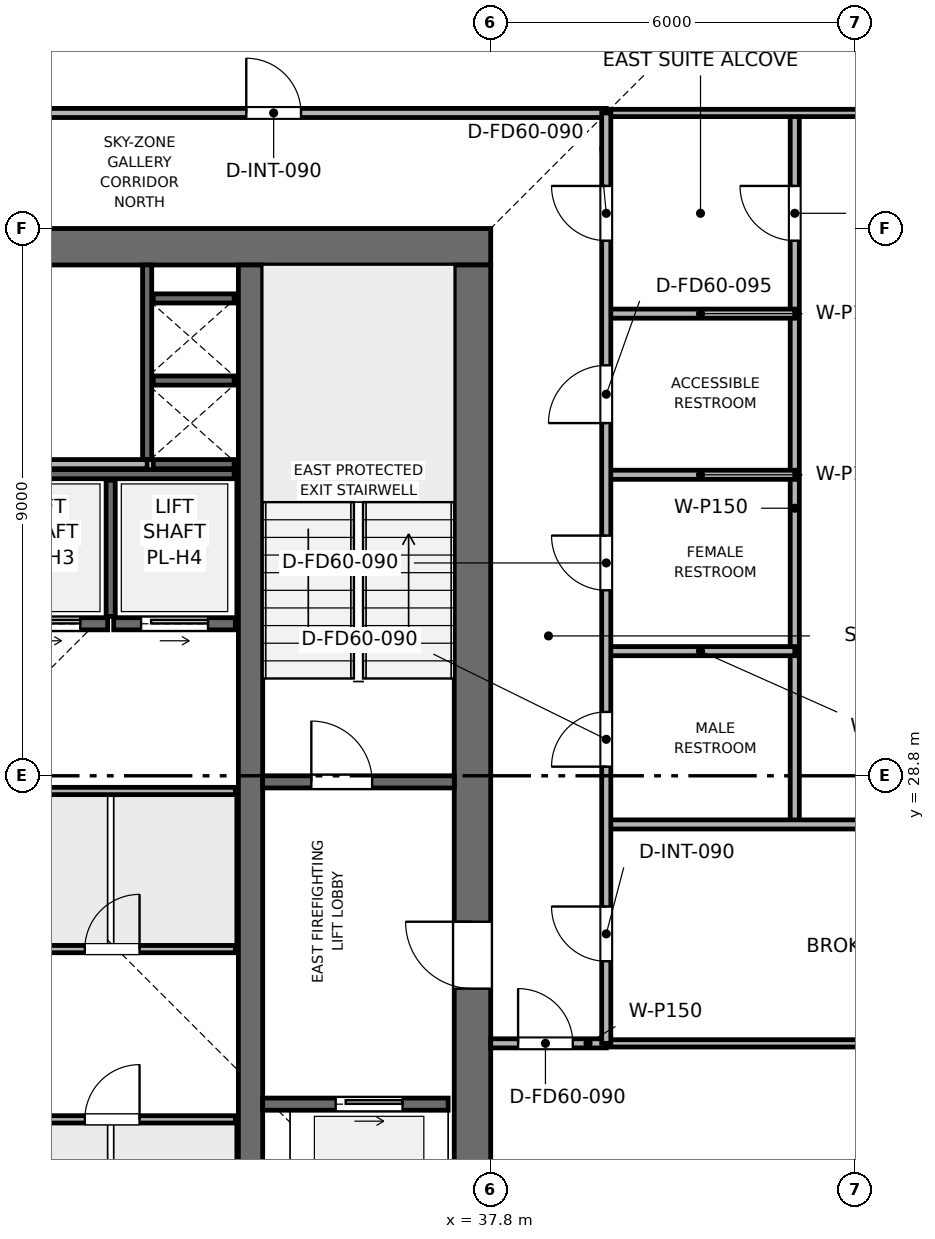
"""IFC4 building model, lengths in metres.
Left out: names, types, materials, properties, quantities, classifications, styles, units other than length and angle.
Written with IfcOpenShell. Run it as: python <this file> out.ifc"""

import sys

from ifc_helpers import new_model, si_unit, direction, frame, frame_2d, origin, place, context, subcontext, project, spatial, rectangle, extrude, element, fill, save


model = new_model("IFC4")
c1 = context("Model", 3, precision=1e-05, world=origin(), true_north=direction((0.0, 1.0)))
c2 = subcontext(c1, "Body", "Model", "MODEL_VIEW")
j1 = project(units=[si_unit("LENGTHUNIT", "METRE"), si_unit("PLANEANGLEUNIT", "RADIAN")], contexts=[c1])
p1 = place(None, origin())
s1 = spatial("IfcSite", under=j1, at=p1, CompositionType="ELEMENT")
p2 = place(p1, origin())
s2 = spatial("IfcBuilding", under=s1, at=p2, CompositionType="ELEMENT")
p3 = place(p2, frame((0.0, 0.0, 344.25)))
s3 = spatial("IfcBuildingStorey", under=s2, at=p3, CompositionType="ELEMENT", Elevation=344.25)
p4 = place(p3, frame((19.8, 37.5, 0.0), z_axis=(0.0, 0.0, 1.0), x_axis=(1.0, 0.0, 0.0)))
e1 = element("IfcWall", 1, at=p4, inside=s3, PredefinedType="SHEAR", context=c2, shape_type="SweptSolid", body=[
    extrude(rectangle(XDim=18.0, YDim=0.6, at=frame_2d((9.0, 0.0))), origin(), (0.0, 0.0, 1.0), 3.75),
])
p5 = place(p4, frame((7.05, 0.0, 0.0)))
e2 = element("IfcOpeningElement", 2, at=p5, cuts=e1, PredefinedType="OPENING", context=c2, shape_type="SweptSolid", body=[
    extrude(rectangle(XDim=1.1, YDim=2.15, at=frame_2d((0.55, 1.075))), frame((0.0, 0.31, 0.0), z_axis=(0.0, -1.0, 0.0), x_axis=(1.0, 0.0, 0.0)), (0.0, 0.0, 1.0), 0.62),
])
p6 = place(p3, frame((37.5, 20.4, 0.0), z_axis=(0.0, 0.0, 1.0), x_axis=(0.0, 1.0, 0.0)))
e3 = element("IfcWall", 3, at=p6, inside=s3, PredefinedType="SHEAR", context=c2, shape_type="SweptSolid", body=[
    extrude(rectangle(XDim=16.8, YDim=0.6, at=frame_2d((8.4, 0.0))), origin(), (0.0, 0.0, 1.0), 3.75),
])
p7 = place(p6, frame((4.9, 0.0, 0.0)))
e4 = element("IfcOpeningElement", 4, at=p7, cuts=e3, PredefinedType="OPENING", context=c2, shape_type="SweptSolid", body=[
    extrude(rectangle(XDim=1.1, YDim=2.15, at=frame_2d((0.55, 1.075))), frame((0.0, 0.31, 0.0), z_axis=(0.0, -1.0, 0.0), x_axis=(1.0, 0.0, 0.0)), (0.0, 0.0, 1.0), 0.62),
])
p8 = place(p3, frame((33.85, 20.4, 0.0), z_axis=(0.0, 0.0, 1.0), x_axis=(0.0, 1.0, 0.0)))
e5 = element("IfcWall", 5, at=p8, inside=s3, PredefinedType="SHEAR", context=c2, shape_type="SweptSolid", body=[
    extrude(rectangle(XDim=16.8, YDim=0.4, at=frame_2d((8.4, 0.0))), origin(), (0.0, 0.0, 1.0), 3.75),
])
p9 = place(p3, frame((34.05, 28.7, 0.0), z_axis=(0.0, 0.0, 1.0), x_axis=(1.0, 0.0, 0.0)))
e6 = element("IfcWall", 6, at=p9, inside=s3, PredefinedType="SHEAR", context=c2, shape_type="SweptSolid", body=[
    extrude(rectangle(XDim=3.15, YDim=0.2, at=frame_2d((1.575, 0.0))), origin(), (0.0, 0.0, 1.0), 3.51),
])
p10 = place(p9, frame((0.8, 0.0, 0.0)))
e7 = element("IfcOpeningElement", 7, at=p10, cuts=e6, PredefinedType="OPENING", context=c2, shape_type="SweptSolid", body=[
    extrude(rectangle(XDim=1.0, YDim=2.1, at=frame_2d((0.5, 1.05))), frame((0.0, 0.11, 0.0), z_axis=(0.0, -1.0, 0.0), x_axis=(1.0, 0.0, 0.0)), (0.0, 0.0, 1.0), 0.22),
])
p11 = place(p3, frame((32.15, 34.0, 0.0), z_axis=(0.0, 0.0, 1.0), x_axis=(0.0, 1.0, 0.0)))
e8 = element("IfcWall", 8, at=p11, inside=s3, PredefinedType="SHEAR", context=c2, shape_type="SweptSolid", body=[
    extrude(rectangle(XDim=3.2, YDim=0.15, at=frame_2d((1.6, 0.0))), origin(), (0.0, 0.0, 1.0), 3.51),
])
for number, where, z_axis, x_axis in (
    (9, (32.25, 33.925, 0.0), (0.0, 0.0, 1.0), (1.0, 0.0, 0.0)),
    (10, (32.25, 35.3, 0.0), (0.0, 0.0, 1.0), (1.0, 0.0, 0.0)),
):
    element("IfcWall", number, at=place(p3, frame(where, z_axis=z_axis, x_axis=x_axis)), inside=s3, PredefinedType="SHEAR", context=c2, shape_type="SweptSolid", body=[
        extrude(rectangle(XDim=1.33, YDim=0.15, at=frame_2d((0.665, 0.0))), origin(), (0.0, 0.0, 1.0), 3.51),
    ])
p12 = place(p3, frame((34.05, 23.4, 0.0), z_axis=(0.0, 0.0, 1.0), x_axis=(1.0, 0.0, 0.0)))
e11 = element("IfcWall", 11, at=p12, inside=s3, PredefinedType="SHEAR", context=c2, shape_type="SweptSolid", body=[
    extrude(rectangle(XDim=3.05, YDim=0.2, at=frame_2d((1.525, 0.0))), origin(), (0.0, 0.0, 1.0), 3.51),
])
p13 = place(p12, frame((1.2, 0.0, 0.0)))
e12 = element("IfcOpeningElement", 12, at=p13, cuts=e11, PredefinedType="OPENING", context=c2, shape_type="SweptSolid", body=[
    extrude(rectangle(XDim=1.1, YDim=2.15, at=frame_2d((0.55, 1.075))), frame((0.0, 0.11, 0.0), z_axis=(0.0, -1.0, 0.0), x_axis=(1.0, 0.0, 0.0)), (0.0, 0.0, 1.0), 0.22),
])
p14 = place(p3, frame((29.5, 31.3, 0.0), z_axis=(0.0, 0.0, 1.0), x_axis=(1.0, 0.0, 0.0)))
e13 = element("IfcWall", 13, at=p14, inside=s3, PredefinedType="SHEAR", context=c2, shape_type="SweptSolid", body=[
    extrude(rectangle(XDim=2.0, YDim=0.2, at=frame_2d((1.0, 0.0))), origin(), (0.0, 0.0, 1.0), 3.51),
])
p15 = place(p14, frame((0.45, 0.0, 0.0)))
e14 = element("IfcOpeningElement", 14, at=p15, cuts=e13, PredefinedType="OPENING", context=c2, shape_type="SweptSolid", body=[
    extrude(rectangle(XDim=1.1, YDim=2.15, at=frame_2d((0.55, 1.075))), frame((0.0, 0.11, 0.0), z_axis=(0.0, -1.0, 0.0), x_axis=(1.0, 0.0, 0.0)), (0.0, 0.0, 1.0), 0.22),
])
p16 = place(p3, frame((31.6, 31.3, 0.0), z_axis=(0.0, 0.0, 1.0), x_axis=(1.0, 0.0, 0.0)))
e15 = element("IfcWall", 15, at=p16, inside=s3, PredefinedType="SHEAR", context=c2, shape_type="SweptSolid", body=[
    extrude(rectangle(XDim=2.0, YDim=0.2, at=frame_2d((1.0, 0.0))), origin(), (0.0, 0.0, 1.0), 3.51),
])
p17 = place(p16, frame((0.45, 0.0, 0.0)))
e16 = element("IfcOpeningElement", 16, at=p17, cuts=e15, PredefinedType="OPENING", context=c2, shape_type="SweptSolid", body=[
    extrude(rectangle(XDim=1.1, YDim=2.15, at=frame_2d((0.55, 1.075))), frame((0.0, 0.11, 0.0), z_axis=(0.0, -1.0, 0.0), x_axis=(1.0, 0.0, 0.0)), (0.0, 0.0, 1.0), 0.22),
])
p18 = place(p3, frame((32.25, 36.65, 0.0), z_axis=(0.0, 0.0, 1.0), x_axis=(1.0, 0.0, 0.0)))
e17 = element("IfcWall", 17, at=p18, inside=s3, PredefinedType="SHEAR", context=c2, shape_type="SweptSolid", body=[
    extrude(rectangle(XDim=1.33, YDim=0.15, at=frame_2d((0.665, 0.0))), origin(), (0.0, 0.0, 1.0), 3.51),
])
p19 = place(p3, frame((29.5, 33.76, 0.0), z_axis=(0.0, 0.0, 1.0), x_axis=(1.0, 0.0, 0.0)))
e18 = element("IfcWall", 18, at=p19, inside=s3, PredefinedType="SHEAR", context=c2, shape_type="SweptSolid", body=[
    extrude(rectangle(XDim=4.08, YDim=0.15, at=frame_2d((2.04, 0.0))), origin(), (0.0, 0.0, 1.0), 3.51),
])
p20 = place(p3, frame((31.55, 31.42, 0.0), z_axis=(0.0, 0.0, 1.0), x_axis=(0.0, 1.0, 0.0)))
e19 = element("IfcWall", 19, at=p20, inside=s3, PredefinedType="SHEAR", context=c2, shape_type="SweptSolid", body=[
    extrude(rectangle(XDim=2.24, YDim=0.15, at=frame_2d((1.12, 0.0))), origin(), (0.0, 0.0, 1.0), 3.51),
])
p21 = place(p3, frame((29.525, 33.925, 0.0), z_axis=(0.0, 0.0, 1.0), x_axis=(1.0, 0.0, 0.0)))
e20 = element("IfcWall", 20, at=p21, inside=s3, PredefinedType="PARTITIONING", context=c2, shape_type="SweptSolid", body=[
    extrude(rectangle(XDim=2.625, YDim=0.15, at=frame_2d((1.312, 0.0))), origin(), (0.0, 0.0, 1.0), 3.51),
])
p22 = place(p3, frame((29.55, 23.15, 0.0), z_axis=(0.0, 0.0, 1.0), x_axis=(1.0, 0.0, 0.0)))
e21 = element("IfcWall", 21, at=p22, inside=s3, PredefinedType="PARTITIONING", context=c2, shape_type="SweptSolid", body=[
    extrude(rectangle(XDim=4.05, YDim=0.12, at=frame_2d((2.025, 0.0))), origin(), (0.0, 0.0, 1.0), 3.51),
])
p23 = place(p22, frame((1.575, 0.0, 0.0)))
e22 = element("IfcOpeningElement", 22, at=p23, cuts=e21, PredefinedType="OPENING", context=c2, shape_type="SweptSolid", body=[
    extrude(rectangle(XDim=0.9, YDim=2.1, at=frame_2d((0.45, 1.05))), frame((0.0, 0.07, 0.0), z_axis=(0.0, -1.0, 0.0), x_axis=(1.0, 0.0, 0.0)), (0.0, 0.0, 1.0), 0.14),
])
p24 = place(p3, frame((29.55, 25.95, 0.0), z_axis=(0.0, 0.0, 1.0), x_axis=(1.0, 0.0, 0.0)))
e23 = element("IfcWall", 23, at=p24, inside=s3, PredefinedType="PARTITIONING", context=c2, shape_type="SweptSolid", body=[
    extrude(rectangle(XDim=4.05, YDim=0.12, at=frame_2d((2.025, 0.0))), origin(), (0.0, 0.0, 1.0), 3.51),
])
p25 = place(p24, frame((1.575, 0.0, 0.0)))
e24 = element("IfcOpeningElement", 24, at=p25, cuts=e23, PredefinedType="OPENING", context=c2, shape_type="SweptSolid", body=[
    extrude(rectangle(XDim=0.9, YDim=2.1, at=frame_2d((0.45, 1.05))), frame((0.0, 0.07, 0.0), z_axis=(0.0, -1.0, 0.0), x_axis=(1.0, 0.0, 0.0)), (0.0, 0.0, 1.0), 0.14),
])
p26 = place(p3, frame((29.55, 28.55, 0.0), z_axis=(0.0, 0.0, 1.0), x_axis=(1.0, 0.0, 0.0)))
e25 = element("IfcWall", 25, at=p26, inside=s3, PredefinedType="PARTITIONING", context=c2, shape_type="SweptSolid", body=[
    extrude(rectangle(XDim=4.05, YDim=0.12, at=frame_2d((2.025, 0.0))), origin(), (0.0, 0.0, 1.0), 3.51),
])
p27 = place(p3, frame((37.8, 24.4, 0.0), z_axis=(0.0, 0.0, 1.0), x_axis=(1.0, 0.0, 0.0)))
e26 = element("IfcWall", 26, at=p27, inside=s3, PredefinedType="PARTITIONING", context=c2, shape_type="SweptSolid", body=[
    extrude(rectangle(XDim=1.9, YDim=0.15, at=frame_2d((0.95, 0.0))), origin(), (0.0, 0.0, 1.0), 3.51),
])
p28 = place(p27, frame((0.45, 0.0, 0.0)))
e27 = element("IfcOpeningElement", 27, at=p28, cuts=e26, PredefinedType="OPENING", context=c2, shape_type="SweptSolid", body=[
    extrude(rectangle(XDim=0.9, YDim=2.1, at=frame_2d((0.45, 1.05))), frame((0.0, 0.085, 0.0), z_axis=(0.0, -1.0, 0.0), x_axis=(1.0, 0.0, 0.0)), (0.0, 0.0, 1.0), 0.17),
])
p29 = place(p3, frame((39.7, 24.4, 0.0), z_axis=(0.0, 0.0, 1.0), x_axis=(1.0, 0.0, 0.0)))
e28 = element("IfcWall", 28, at=p29, inside=s3, PredefinedType="PARTITIONING", context=c2, shape_type="SweptSolid", body=[
    extrude(rectangle(XDim=10.27, YDim=0.12, at=frame_2d((5.135, 0.0))), origin(), (0.0, 0.0, 1.0), 3.135),
])
p30 = place(p3, frame((42.8, 28.0, 0.0), z_axis=(0.0, 0.0, 1.0), x_axis=(0.0, 1.0, 0.0)))
e29 = element("IfcWall", 29, at=p30, inside=s3, PredefinedType="PARTITIONING", context=c2, shape_type="SweptSolid", body=[
    extrude(rectangle(XDim=11.7, YDim=0.15, at=frame_2d((5.85, 0.0))), origin(), (0.0, 0.0, 1.0), 3.095),
])
p31 = place(p30, frame((9.6, 0.0, 0.0)))
e30 = element("IfcOpeningElement", 30, at=p31, cuts=e29, PredefinedType="OPENING", context=c2, shape_type="SweptSolid", body=[
    extrude(rectangle(XDim=0.9, YDim=2.1, at=frame_2d((0.45, 1.05))), frame((0.0, 0.085, 0.0), z_axis=(0.0, -1.0, 0.0), x_axis=(1.0, 0.0, 0.0)), (0.0, 0.0, 1.0), 0.17),
])
p32 = place(p3, frame((39.7, 28.0, 0.0), z_axis=(0.0, 0.0, 1.0), x_axis=(1.0, 0.0, 0.0)))
e31 = element("IfcWall", 31, at=p32, inside=s3, PredefinedType="PARTITIONING", context=c2, shape_type="SweptSolid", body=[
    extrude(rectangle(XDim=10.27, YDim=0.15, at=frame_2d((5.135, 0.0))), origin(), (0.0, 0.0, 1.0), 3.135),
])
for number, where, z_axis, x_axis in (
    (32, (39.7, 36.4, 0.0), (0.0, 0.0, 1.0), (1.0, 0.0, 0.0)),
    (33, (39.7, 30.85, 0.0), (0.0, 0.0, 1.0), (1.0, 0.0, 0.0)),
    (34, (39.7, 33.75, 0.0), (0.0, 0.0, 1.0), (1.0, 0.0, 0.0)),
):
    element("IfcWall", number, at=place(p3, frame(where, z_axis=z_axis, x_axis=x_axis)), inside=s3, PredefinedType="PARTITIONING", context=c2, shape_type="SweptSolid", body=[
        extrude(rectangle(XDim=3.1, YDim=0.15, at=frame_2d((1.55, 0.0))), origin(), (0.0, 0.0, 1.0), 3.135),
    ])
p33 = place(p3, frame((39.7, 39.7, 0.0), z_axis=(0.0, 0.0, 1.0), x_axis=(1.0, 0.0, 0.0)))
e35 = element("IfcWall", 35, at=p33, inside=s3, PredefinedType="PARTITIONING", context=c2, shape_type="SweptSolid", body=[
    extrude(rectangle(XDim=10.27, YDim=0.12, at=frame_2d((5.135, 0.0))), origin(), (0.0, 0.0, 1.0), 3.095),
])
p34 = place(p3, frame((17.9, 39.7, 0.0), z_axis=(0.0, 0.0, 1.0), x_axis=(1.0, 0.0, 0.0)))
e36 = element("IfcWall", 36, at=p34, inside=s3, PredefinedType="PARTITIONING", context=c2, shape_type="SweptSolid", body=[
    extrude(rectangle(XDim=21.8, YDim=0.15, at=frame_2d((10.9, 0.0))), origin(), (0.0, 0.0, 1.0), 3.095),
])
p35 = place(p34, frame((0.765, 0.0, 0.0)))
e37 = element("IfcOpeningElement", 37, at=p35, cuts=e36, PredefinedType="OPENING", context=c2, shape_type="SweptSolid", body=[
    extrude(rectangle(XDim=0.9, YDim=2.1, at=frame_2d((0.45, 1.05))), frame((0.0, 0.085, 0.0), z_axis=(0.0, -1.0, 0.0), x_axis=(1.0, 0.0, 0.0)), (0.0, 0.0, 1.0), 0.17),
])
p36 = place(p34, frame((6.195, 0.0, 0.0)))
e38 = element("IfcOpeningElement", 38, at=p36, cuts=e36, PredefinedType="OPENING", context=c2, shape_type="SweptSolid", body=[
    extrude(rectangle(XDim=0.9, YDim=2.1, at=frame_2d((0.45, 1.05))), frame((0.0, 0.085, 0.0), z_axis=(0.0, -1.0, 0.0), x_axis=(1.0, 0.0, 0.0)), (0.0, 0.0, 1.0), 0.17),
])
p37 = place(p34, frame((15.88, 0.0, 0.0)))
e39 = element("IfcOpeningElement", 39, at=p37, cuts=e36, PredefinedType="OPENING", context=c2, shape_type="SweptSolid", body=[
    extrude(rectangle(XDim=0.9, YDim=2.1, at=frame_2d((0.45, 1.05))), frame((0.0, 0.085, 0.0), z_axis=(0.0, -1.0, 0.0), x_axis=(1.0, 0.0, 0.0)), (0.0, 0.0, 1.0), 0.17),
])
p38 = place(p3, frame((39.7, 24.4, 0.0), z_axis=(0.0, 0.0, 1.0), x_axis=(0.0, 1.0, 0.0)))
e40 = element("IfcWall", 40, at=p38, inside=s3, PredefinedType="PARTITIONING", context=c2, shape_type="SweptSolid", body=[
    extrude(rectangle(XDim=15.3, YDim=0.15, at=frame_2d((7.65, 0.0))), origin(), (0.0, 0.0, 1.0), 3.095),
])
p39 = place(p38, frame((1.35, 0.0, 0.0)))
e41 = element("IfcOpeningElement", 41, at=p39, cuts=e40, PredefinedType="OPENING", context=c2, shape_type="SweptSolid", body=[
    extrude(rectangle(XDim=0.9, YDim=2.1, at=frame_2d((0.45, 1.05))), frame((0.0, 0.085, 0.0), z_axis=(0.0, -1.0, 0.0), x_axis=(1.0, 0.0, 0.0)), (0.0, 0.0, 1.0), 0.17),
])
p40 = place(p38, frame((4.55, 0.0, 0.0)))
e42 = element("IfcOpeningElement", 42, at=p40, cuts=e40, PredefinedType="OPENING", context=c2, shape_type="SweptSolid", body=[
    extrude(rectangle(XDim=0.9, YDim=2.1, at=frame_2d((0.45, 1.05))), frame((0.0, 0.085, 0.0), z_axis=(0.0, -1.0, 0.0), x_axis=(1.0, 0.0, 0.0)), (0.0, 0.0, 1.0), 0.17),
])
p41 = place(p38, frame((7.45, 0.0, 0.0)))
e43 = element("IfcOpeningElement", 43, at=p41, cuts=e40, PredefinedType="OPENING", context=c2, shape_type="SweptSolid", body=[
    extrude(rectangle(XDim=0.9, YDim=2.1, at=frame_2d((0.45, 1.05))), frame((0.0, 0.085, 0.0), z_axis=(0.0, -1.0, 0.0), x_axis=(1.0, 0.0, 0.0)), (0.0, 0.0, 1.0), 0.17),
])
p42 = place(p38, frame((10.2, 0.0, 0.0)))
e44 = element("IfcOpeningElement", 44, at=p42, cuts=e40, PredefinedType="OPENING", context=c2, shape_type="SweptSolid", body=[
    extrude(rectangle(XDim=0.95, YDim=2.1, at=frame_2d((0.475, 1.05))), frame((0.0, 0.085, 0.0), z_axis=(0.0, -1.0, 0.0), x_axis=(1.0, 0.0, 0.0)), (0.0, 0.0, 1.0), 0.17),
])
p43 = place(p38, frame((13.2, 0.0, 0.0)))
e45 = element("IfcOpeningElement", 45, at=p43, cuts=e40, PredefinedType="OPENING", context=c2, shape_type="SweptSolid", body=[
    extrude(rectangle(XDim=0.9, YDim=2.1, at=frame_2d((0.45, 1.05))), frame((0.0, 0.085, 0.0), z_axis=(0.0, -1.0, 0.0), x_axis=(1.0, 0.0, 0.0)), (0.0, 0.0, 1.0), 0.17),
])
p44 = place(p10, origin())
e46 = element("IfcDoor", 46, at=p44, inside=s3, OperationType="SINGLE_SWING_LEFT", PredefinedType="DOOR", context=c2, shape_type="SweptSolid", body=[
    extrude(rectangle(XDim=1.0, YDim=2.1, at=frame_2d((0.5, 1.05))), frame((0.0, 0.025, 0.0), z_axis=(0.0, -1.0, 0.0), x_axis=(1.0, 0.0, 0.0)), (0.0, 0.0, 1.0), 0.05),
])
fill(e7, e46)
p45 = place(p13, origin())
e47 = element("IfcDoor", 47, at=p45, inside=s3, OperationType="SLIDING_TO_RIGHT", PredefinedType="DOOR", context=c2, shape_type="SweptSolid", body=[
    extrude(rectangle(XDim=1.1, YDim=2.15, at=frame_2d((0.55, 1.075))), frame((0.0, 0.025, 0.0), z_axis=(0.0, -1.0, 0.0), x_axis=(1.0, 0.0, 0.0)), (0.0, 0.0, 1.0), 0.05),
])
fill(e12, e47)
p46 = place(p15, origin())
e48 = element("IfcDoor", 48, at=p46, inside=s3, OperationType="SLIDING_TO_RIGHT", PredefinedType="DOOR", context=c2, shape_type="SweptSolid", body=[
    extrude(rectangle(XDim=1.1, YDim=2.15, at=frame_2d((0.55, 1.075))), frame((0.0, 0.025, 0.0), z_axis=(0.0, -1.0, 0.0), x_axis=(1.0, 0.0, 0.0)), (0.0, 0.0, 1.0), 0.05),
])
fill(e14, e48)
p47 = place(p17, origin())
e49 = element("IfcDoor", 49, at=p47, inside=s3, OperationType="SLIDING_TO_RIGHT", PredefinedType="DOOR", context=c2, shape_type="SweptSolid", body=[
    extrude(rectangle(XDim=1.1, YDim=2.15, at=frame_2d((0.55, 1.075))), frame((0.0, 0.025, 0.0), z_axis=(0.0, -1.0, 0.0), x_axis=(1.0, 0.0, 0.0)), (0.0, 0.0, 1.0), 0.05),
])
fill(e16, e49)
p48 = place(p23, origin())
e50 = element("IfcDoor", 50, at=p48, inside=s3, OperationType="SINGLE_SWING_RIGHT", PredefinedType="DOOR", context=c2, shape_type="SweptSolid", body=[
    extrude(rectangle(XDim=0.9, YDim=2.1, at=frame_2d((0.45, 1.05))), frame((0.0, 0.025, 0.0), z_axis=(0.0, -1.0, 0.0), x_axis=(1.0, 0.0, 0.0)), (0.0, 0.0, 1.0), 0.05),
])
fill(e22, e50)
p49 = place(p25, origin())
e51 = element("IfcDoor", 51, at=p49, inside=s3, OperationType="SINGLE_SWING_RIGHT", PredefinedType="DOOR", context=c2, shape_type="SweptSolid", body=[
    extrude(rectangle(XDim=0.9, YDim=2.1, at=frame_2d((0.45, 1.05))), frame((0.0, 0.025, 0.0), z_axis=(0.0, -1.0, 0.0), x_axis=(1.0, 0.0, 0.0)), (0.0, 0.0, 1.0), 0.05),
])
fill(e24, e51)
p50 = place(p28, origin())
e52 = element("IfcDoor", 52, at=p50, inside=s3, OperationType="SINGLE_SWING_LEFT", PredefinedType="DOOR", context=c2, shape_type="SweptSolid", body=[
    extrude(rectangle(XDim=0.9, YDim=2.1, at=frame_2d((0.45, 1.05))), frame((0.0, 0.025, 0.0), z_axis=(0.0, -1.0, 0.0), x_axis=(1.0, 0.0, 0.0)), (0.0, 0.0, 1.0), 0.05),
])
fill(e27, e52)
p51 = place(p31, origin())
e53 = element("IfcDoor", 53, at=p51, inside=s3, OperationType="SINGLE_SWING_RIGHT", PredefinedType="DOOR", context=c2, shape_type="SweptSolid", body=[
    extrude(rectangle(XDim=0.9, YDim=2.1, at=frame_2d((0.45, 1.05))), frame((0.0, 0.025, 0.0), z_axis=(0.0, -1.0, 0.0), x_axis=(1.0, 0.0, 0.0)), (0.0, 0.0, 1.0), 0.05),
])
fill(e30, e53)
p52 = place(p37, origin())
e54 = element("IfcDoor", 54, at=p52, inside=s3, OperationType="SINGLE_SWING_LEFT", PredefinedType="DOOR", context=c2, shape_type="SweptSolid", body=[
    extrude(rectangle(XDim=0.9, YDim=2.1, at=frame_2d((0.45, 1.05))), frame((0.0, 0.025, 0.0), z_axis=(0.0, -1.0, 0.0), x_axis=(1.0, 0.0, 0.0)), (0.0, 0.0, 1.0), 0.05),
])
fill(e39, e54)
p53 = place(p39, origin())
e55 = element("IfcDoor", 55, at=p53, inside=s3, OperationType="SINGLE_SWING_RIGHT", PredefinedType="DOOR", context=c2, shape_type="SweptSolid", body=[
    extrude(rectangle(XDim=0.9, YDim=2.1, at=frame_2d((0.45, 1.05))), frame((0.0, 0.025, 0.0), z_axis=(0.0, -1.0, 0.0), x_axis=(1.0, 0.0, 0.0)), (0.0, 0.0, 1.0), 0.05),
])
fill(e41, e55)
p54 = place(p40, origin())
e56 = element("IfcDoor", 56, at=p54, inside=s3, OperationType="SINGLE_SWING_LEFT", PredefinedType="DOOR", context=c2, shape_type="SweptSolid", body=[
    extrude(rectangle(XDim=0.9, YDim=2.1, at=frame_2d((0.45, 1.05))), frame((0.0, 0.025, 0.0), z_axis=(0.0, -1.0, 0.0), x_axis=(1.0, 0.0, 0.0)), (0.0, 0.0, 1.0), 0.05),
])
fill(e42, e56)
p55 = place(p41, origin())
e57 = element("IfcDoor", 57, at=p55, inside=s3, OperationType="SINGLE_SWING_RIGHT", PredefinedType="DOOR", context=c2, shape_type="SweptSolid", body=[
    extrude(rectangle(XDim=0.9, YDim=2.1, at=frame_2d((0.45, 1.05))), frame((0.0, 0.025, 0.0), z_axis=(0.0, -1.0, 0.0), x_axis=(1.0, 0.0, 0.0)), (0.0, 0.0, 1.0), 0.05),
])
fill(e43, e57)
p56 = place(p42, origin())
e58 = element("IfcDoor", 58, at=p56, inside=s3, OperationType="SINGLE_SWING_LEFT", PredefinedType="DOOR", context=c2, shape_type="SweptSolid", body=[
    extrude(rectangle(XDim=0.95, YDim=2.1, at=frame_2d((0.475, 1.05))), frame((0.0, 0.025, 0.0), z_axis=(0.0, -1.0, 0.0), x_axis=(1.0, 0.0, 0.0)), (0.0, 0.0, 1.0), 0.05),
])
fill(e44, e58)
p57 = place(p43, origin())
e59 = element("IfcDoor", 59, at=p57, inside=s3, OperationType="SINGLE_SWING_RIGHT", PredefinedType="DOOR", context=c2, shape_type="SweptSolid", body=[
    extrude(rectangle(XDim=0.9, YDim=2.1, at=frame_2d((0.45, 1.05))), frame((0.0, 0.025, 0.0), z_axis=(0.0, -1.0, 0.0), x_axis=(1.0, 0.0, 0.0)), (0.0, 0.0, 1.0), 0.05),
])
fill(e45, e59)
p58 = place(p7, origin())
e60 = element("IfcDoor", 60, at=p58, inside=s3, OperationType="SINGLE_SWING_RIGHT", PredefinedType="DOOR", context=c2, shape_type="SweptSolid", body=[
    extrude(rectangle(XDim=1.1, YDim=2.15, at=frame_2d((0.55, 1.075))), frame((0.0, 0.025, 0.0), z_axis=(0.0, -1.0, 0.0), x_axis=(1.0, 0.0, 0.0)), (0.0, 0.0, 1.0), 0.05),
])
fill(e4, e60)
save(model, sys.argv[1])
